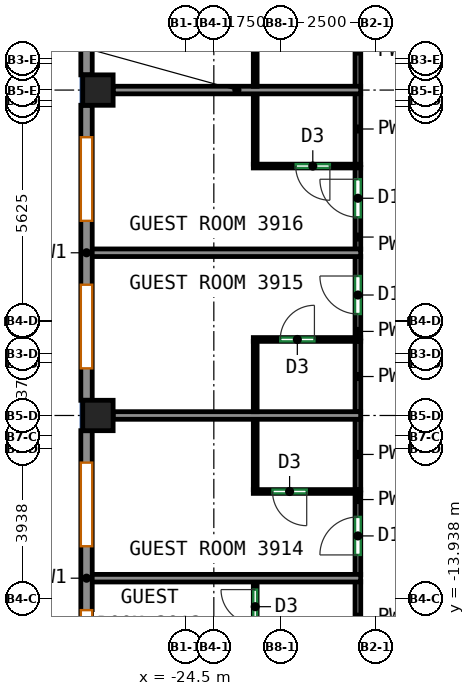
"""IFC4 building model, lengths in metres.
Left out: names, types, materials, properties, quantities, classifications, styles, units other than length and angle.
Written with IfcOpenShell. Run it as: python <this file> out.ifc"""

import sys

from ifc_helpers import new_model, si_unit, direction, frame, frame_2d, origin, origin_2d, place, context, subcontext, project, spatial, rectangle, extrude, source, transform, mapped, element, fill, save


model = new_model("IFC4")
c1 = context("Model", 3, precision=1e-05, world=origin(), true_north=direction((0.0, 1.0)))
c2 = subcontext(c1, "Body", "Model", "MODEL_VIEW")
j1 = project(units=[si_unit("LENGTHUNIT", "METRE"), si_unit("PLANEANGLEUNIT", "RADIAN")], contexts=[c1])
p1 = place(None, origin())
s1 = spatial("IfcSite", under=j1, at=p1, CompositionType="ELEMENT")
p2 = place(p1, origin())
s2 = spatial("IfcBuilding", under=s1, at=p2, CompositionType="ELEMENT")
p3 = place(p2, frame((0.0, 0.0, 168.5)))
s3 = spatial("IfcBuildingStorey", under=s2, at=p3, CompositionType="ELEMENT", Elevation=168.5)
m1 = source(origin(), c2, "Body", "SweptSolid", [
    extrude(rectangle(XDim=0.8, YDim=0.8, at=origin_2d()), origin(), (0.0, 0.0, 1.0), 3.12),
])
for number, where, z_axis, x_axis in (
    (1, (-26.8, -9.125, 0.0), (0.0, 0.0, 1.0), (1.0, 0.0, 0.0)),
    (2, (-26.8, -0.562, 0.0), (0.0, 0.0, 1.0), (1.0, 0.0, 0.0)),
):
    element("IfcColumn", number, at=place(p3, frame(where, z_axis=z_axis, x_axis=x_axis)), inside=s3, PredefinedType="COLUMN", context=c2, shape_type="MappedRepresentation", body=[
        mapped(m1, transform((0.0, 0.0, 0.0))),
    ])
m2 = source(origin(), c2, "Body", "SweptSolid", [
    extrude(rectangle(XDim=7.763, YDim=0.3, at=frame_2d((3.881, 0.0))), origin(), (0.0, 0.0, 1.0), 3.12),
])
p4 = place(p3, frame((-27.1, 7.6, 0.0), z_axis=(0.0, 0.0, 1.0), x_axis=(0.0, -1.0, 0.0)))
e3 = element("IfcWall", 3, at=p4, inside=s3, PredefinedType="SOLIDWALL", context=c2, shape_type="MappedRepresentation", body=[
    mapped(m2, transform((0.0, 0.0, 0.0))),
])
p5 = place(p4, frame((0.841, 0.0, 0.85)))
e4 = element("IfcOpeningElement", 4, at=p5, cuts=e3, PredefinedType="OPENING", context=c2, shape_type="SweptSolid", body=[
    extrude(rectangle(XDim=2.2, YDim=1.95, at=frame_2d((1.1, 0.975))), frame((0.0, 0.16, 0.0), z_axis=(0.0, -1.0, 0.0), x_axis=(1.0, 0.0, 0.0)), (0.0, 0.0, 1.0), 0.32),
])
p6 = place(p4, frame((4.722, 0.0, 0.85)))
e5 = element("IfcOpeningElement", 5, at=p6, cuts=e3, PredefinedType="OPENING", context=c2, shape_type="SweptSolid", body=[
    extrude(rectangle(XDim=2.2, YDim=1.95, at=frame_2d((1.1, 0.975))), frame((0.0, 0.16, 0.0), z_axis=(0.0, -1.0, 0.0), x_axis=(1.0, 0.0, 0.0)), (0.0, 0.0, 1.0), 0.32),
])
p7 = place(p3, frame((-27.1, -0.962, 0.0), z_axis=(0.0, 0.0, 1.0), x_axis=(0.0, -1.0, 0.0)))
e6 = element("IfcWall", 6, at=p7, inside=s3, PredefinedType="SOLIDWALL", context=c2, shape_type="MappedRepresentation", body=[
    mapped(m2, transform((0.0, 0.0, 0.0))),
])
p8 = place(p7, frame((0.841, 0.0, 0.85)))
e7 = element("IfcOpeningElement", 7, at=p8, cuts=e6, PredefinedType="OPENING", context=c2, shape_type="SweptSolid", body=[
    extrude(rectangle(XDim=2.2, YDim=1.95, at=frame_2d((1.1, 0.975))), frame((0.0, 0.16, 0.0), z_axis=(0.0, -1.0, 0.0), x_axis=(1.0, 0.0, 0.0)), (0.0, 0.0, 1.0), 0.32),
])
p9 = place(p7, frame((4.722, 0.0, 0.85)))
e8 = element("IfcOpeningElement", 8, at=p9, cuts=e6, PredefinedType="OPENING", context=c2, shape_type="SweptSolid", body=[
    extrude(rectangle(XDim=2.2, YDim=1.95, at=frame_2d((1.1, 0.975))), frame((0.0, 0.16, 0.0), z_axis=(0.0, -1.0, 0.0), x_axis=(1.0, 0.0, 0.0)), (0.0, 0.0, 1.0), 0.32),
])
p10 = place(p3, frame((-27.1, -9.525, 0.0), z_axis=(0.0, 0.0, 1.0), x_axis=(0.0, -1.0, 0.0)))
e9 = element("IfcWall", 9, at=p10, inside=s3, PredefinedType="SOLIDWALL", context=c2, shape_type="MappedRepresentation", body=[
    mapped(m2, transform((0.0, 0.0, 0.0))),
])
p11 = place(p10, frame((0.841, 0.0, 0.85)))
e10 = element("IfcOpeningElement", 10, at=p11, cuts=e9, PredefinedType="OPENING", context=c2, shape_type="SweptSolid", body=[
    extrude(rectangle(XDim=2.2, YDim=1.95, at=frame_2d((1.1, 0.975))), frame((0.0, 0.16, 0.0), z_axis=(0.0, -1.0, 0.0), x_axis=(1.0, 0.0, 0.0)), (0.0, 0.0, 1.0), 0.32),
])
p12 = place(p10, frame((4.722, 0.0, 0.85)))
e11 = element("IfcOpeningElement", 11, at=p12, cuts=e9, PredefinedType="OPENING", context=c2, shape_type="SweptSolid", body=[
    extrude(rectangle(XDim=2.2, YDim=1.95, at=frame_2d((1.1, 0.975))), frame((0.0, 0.16, 0.0), z_axis=(0.0, -1.0, 0.0), x_axis=(1.0, 0.0, 0.0)), (0.0, 0.0, 1.0), 0.32),
])
p13 = place(p3, frame((-19.959, -15.366, 0.0), z_axis=(0.0, 0.0, 1.0), x_axis=(0.0, 1.0, 0.0)))
e12 = element("IfcWall", 12, at=p13, inside=s3, PredefinedType="PARTITIONING", context=c2, shape_type="SweptSolid", body=[
    extrude(rectangle(XDim=1.87, YDim=0.15, at=frame_2d((0.935, 0.0))), origin(), (0.0, 0.0, 1.0), 3.12),
])
p14 = place(p3, frame((-19.959, -13.316, 0.0), z_axis=(0.0, 0.0, 1.0), x_axis=(0.0, 1.0, 0.0)))
e13 = element("IfcWall", 13, at=p14, inside=s3, PredefinedType="PARTITIONING", context=c2, shape_type="SweptSolid", body=[
    extrude(rectangle(XDim=2.151, YDim=0.15, at=frame_2d((1.075, 0.0))), origin(), (0.0, 0.0, 1.0), 3.12),
])
p15 = place(p14, frame((0.522, 0.0, 0.0)))
e14 = element("IfcOpeningElement", 14, at=p15, cuts=e13, PredefinedType="OPENING", context=c2, shape_type="SweptSolid", body=[
    extrude(rectangle(XDim=1.0, YDim=2.1, at=frame_2d((0.5, 1.05))), frame((0.0, 0.085, 0.0), z_axis=(0.0, -1.0, 0.0), x_axis=(1.0, 0.0, 0.0)), (0.0, 0.0, 1.0), 0.17),
])
p16 = place(p3, frame((-19.959, -11.085, 0.0), z_axis=(0.0, 0.0, 1.0), x_axis=(0.0, 1.0, 0.0)))
e15 = element("IfcWall", 15, at=p16, inside=s3, PredefinedType="PARTITIONING", context=c2, shape_type="SweptSolid", body=[
    extrude(rectangle(XDim=1.87, YDim=0.15, at=frame_2d((0.935, 0.0))), origin(), (0.0, 0.0, 1.0), 3.12),
])
p17 = place(p3, frame((-19.959, -7.085, 0.0), z_axis=(0.0, 0.0, 1.0), x_axis=(0.0, 1.0, 0.0)))
e16 = element("IfcWall", 16, at=p17, inside=s3, PredefinedType="PARTITIONING", context=c2, shape_type="SweptSolid", body=[
    extrude(rectangle(XDim=2.152, YDim=0.15, at=frame_2d((1.076, 0.0))), origin(), (0.0, 0.0, 1.0), 3.12),
])
p18 = place(p17, frame((0.63, 0.0, 0.0)))
e17 = element("IfcOpeningElement", 17, at=p18, cuts=e16, PredefinedType="OPENING", context=c2, shape_type="SweptSolid", body=[
    extrude(rectangle(XDim=1.0, YDim=2.1, at=frame_2d((0.5, 1.05))), frame((0.0, 0.085, 0.0), z_axis=(0.0, -1.0, 0.0), x_axis=(1.0, 0.0, 0.0)), (0.0, 0.0, 1.0), 0.17),
])
p19 = place(p3, frame((-19.959, -9.035, 0.0), z_axis=(0.0, 0.0, 1.0), x_axis=(0.0, 1.0, 0.0)))
e18 = element("IfcWall", 18, at=p19, inside=s3, PredefinedType="PARTITIONING", context=c2, shape_type="SweptSolid", body=[
    extrude(rectangle(XDim=1.87, YDim=0.15, at=frame_2d((0.935, 0.0))), origin(), (0.0, 0.0, 1.0), 3.12),
])
p20 = place(p3, frame((-19.959, -4.753, 0.0), z_axis=(0.0, 0.0, 1.0), x_axis=(0.0, 1.0, 0.0)))
e19 = element("IfcWall", 19, at=p20, inside=s3, PredefinedType="PARTITIONING", context=c2, shape_type="SweptSolid", body=[
    extrude(rectangle(XDim=2.151, YDim=0.15, at=frame_2d((1.075, 0.0))), origin(), (0.0, 0.0, 1.0), 3.12),
])
p21 = place(p20, frame((0.844, 0.0, 0.0)))
e20 = element("IfcOpeningElement", 20, at=p21, cuts=e19, PredefinedType="OPENING", context=c2, shape_type="SweptSolid", body=[
    extrude(rectangle(XDim=1.0, YDim=2.1, at=frame_2d((0.5, 1.05))), frame((0.0, 0.085, 0.0), z_axis=(0.0, -1.0, 0.0), x_axis=(1.0, 0.0, 0.0)), (0.0, 0.0, 1.0), 0.17),
])
for number, where, z_axis, x_axis in (
    (21, (-19.959, -2.522, 0.0), (0.0, 0.0, 1.0), (0.0, 1.0, 0.0)),
    (22, (-19.959, -0.472, 0.0), (0.0, 0.0, 1.0), (0.0, 1.0, 0.0)),
):
    element("IfcWall", number, at=place(p3, frame(where, z_axis=z_axis, x_axis=x_axis)), inside=s3, PredefinedType="PARTITIONING", context=c2, shape_type="SweptSolid", body=[
        extrude(rectangle(XDim=1.87, YDim=0.15, at=frame_2d((0.935, 0.0))), origin(), (0.0, 0.0, 1.0), 3.12),
    ])
p22 = place(p3, frame((-22.661, -15.356, 0.0), z_axis=(0.0, 0.0, 1.0), x_axis=(0.0, 1.0, 0.0)))
e23 = element("IfcWall", 23, at=p22, inside=s3, PredefinedType="PARTITIONING", context=c2, shape_type="SweptSolid", body=[
    extrude(rectangle(XDim=1.85, YDim=0.1, at=frame_2d((0.925, 0.0))), origin(), (0.0, 0.0, 1.0), 3.12),
])
p23 = place(p22, frame((0.75, 0.0, 0.0)))
e24 = element("IfcOpeningElement", 24, at=p23, cuts=e23, PredefinedType="OPENING", context=c2, shape_type="SweptSolid", body=[
    extrude(rectangle(XDim=0.9, YDim=2.1, at=frame_2d((0.45, 1.05))), frame((0.0, 0.06, 0.0), z_axis=(0.0, -1.0, 0.0), x_axis=(1.0, 0.0, 0.0)), (0.0, 0.0, 1.0), 0.12),
])
p24 = place(p3, frame((-27.0, -13.406, 0.0), z_axis=(0.0, 0.0, 1.0), x_axis=(1.0, 0.0, 0.0)))
e25 = element("IfcWall", 25, at=p24, inside=s3, PredefinedType="PARTITIONING", context=c2, shape_type="SweptSolid", body=[
    extrude(rectangle(XDim=7.114, YDim=0.2, at=frame_2d((3.557, 0.0))), origin(), (0.0, 0.0, 1.0), 3.12),
])
p25 = place(p3, frame((-19.886, -11.125, 0.0), z_axis=(0.0, 0.0, 1.0), x_axis=(-1.0, 0.0, 0.0)))
e26 = element("IfcWall", 26, at=p25, inside=s3, PredefinedType="PARTITIONING", context=c2, shape_type="SweptSolid", body=[
    extrude(rectangle(XDim=2.825, YDim=0.1, at=frame_2d((1.413, 0.0))), origin(), (0.0, 0.0, 1.0), 3.12),
])
p26 = place(p25, frame((1.42, 0.0, 0.0)))
e27 = element("IfcOpeningElement", 27, at=p26, cuts=e26, PredefinedType="OPENING", context=c2, shape_type="SweptSolid", body=[
    extrude(rectangle(XDim=0.9, YDim=2.1, at=frame_2d((0.45, 1.05))), frame((0.0, 0.06, 0.0), z_axis=(0.0, -1.0, 0.0), x_axis=(1.0, 0.0, 0.0)), (0.0, 0.0, 1.0), 0.12),
])
p27 = place(p3, frame((-22.661, -11.075, 0.0), z_axis=(0.0, 0.0, 1.0), x_axis=(0.0, 1.0, 0.0)))
e28 = element("IfcWall", 28, at=p27, inside=s3, PredefinedType="PARTITIONING", context=c2, shape_type="SweptSolid", body=[
    extrude(rectangle(XDim=1.85, YDim=0.1, at=frame_2d((0.925, 0.0))), origin(), (0.0, 0.0, 1.0), 3.12),
])
p28 = place(p3, frame((-26.4, -9.125, 0.0), z_axis=(0.0, 0.0, 1.0), x_axis=(1.0, 0.0, 0.0)))
e29 = element("IfcWall", 29, at=p28, inside=s3, PredefinedType="PARTITIONING", context=c2, shape_type="SweptSolid", body=[
    extrude(rectangle(XDim=6.514, YDim=0.2, at=frame_2d((3.257, 0.0))), origin(), (0.0, 0.0, 1.0), 3.12),
])
p29 = place(p3, frame((-22.711, -7.125, 0.0), z_axis=(0.0, 0.0, 1.0), x_axis=(1.0, 0.0, 0.0)))
e30 = element("IfcWall", 30, at=p29, inside=s3, PredefinedType="PARTITIONING", context=c2, shape_type="SweptSolid", body=[
    extrude(rectangle(XDim=2.825, YDim=0.1, at=frame_2d((1.413, 0.0))), origin(), (0.0, 0.0, 1.0), 3.12),
])
p30 = place(p29, frame((0.708, 0.0, 0.0)))
e31 = element("IfcOpeningElement", 31, at=p30, cuts=e30, PredefinedType="OPENING", context=c2, shape_type="SweptSolid", body=[
    extrude(rectangle(XDim=0.9, YDim=2.1, at=frame_2d((0.45, 1.05))), frame((0.0, 0.06, 0.0), z_axis=(0.0, -1.0, 0.0), x_axis=(1.0, 0.0, 0.0)), (0.0, 0.0, 1.0), 0.12),
])
p31 = place(p3, frame((-22.661, -9.025, 0.0), z_axis=(0.0, 0.0, 1.0), x_axis=(0.0, 1.0, 0.0)))
e32 = element("IfcWall", 32, at=p31, inside=s3, PredefinedType="PARTITIONING", context=c2, shape_type="SweptSolid", body=[
    extrude(rectangle(XDim=1.85, YDim=0.1, at=frame_2d((0.925, 0.0))), origin(), (0.0, 0.0, 1.0), 3.12),
])
p32 = place(p3, frame((-27.0, -4.843, 0.0), z_axis=(0.0, 0.0, 1.0), x_axis=(1.0, 0.0, 0.0)))
e33 = element("IfcWall", 33, at=p32, inside=s3, PredefinedType="PARTITIONING", context=c2, shape_type="SweptSolid", body=[
    extrude(rectangle(XDim=7.114, YDim=0.2, at=frame_2d((3.557, 0.0))), origin(), (0.0, 0.0, 1.0), 3.12),
])
p33 = place(p3, frame((-19.886, -2.562, 0.0), z_axis=(0.0, 0.0, 1.0), x_axis=(-1.0, 0.0, 0.0)))
e34 = element("IfcWall", 34, at=p33, inside=s3, PredefinedType="PARTITIONING", context=c2, shape_type="SweptSolid", body=[
    extrude(rectangle(XDim=2.825, YDim=0.1, at=frame_2d((1.413, 0.0))), origin(), (0.0, 0.0, 1.0), 3.12),
])
p34 = place(p33, frame((0.81, 0.0, 0.0)))
e35 = element("IfcOpeningElement", 35, at=p34, cuts=e34, PredefinedType="OPENING", context=c2, shape_type="SweptSolid", body=[
    extrude(rectangle(XDim=0.9, YDim=2.1, at=frame_2d((0.45, 1.05))), frame((0.0, 0.06, 0.0), z_axis=(0.0, -1.0, 0.0), x_axis=(1.0, 0.0, 0.0)), (0.0, 0.0, 1.0), 0.12),
])
p35 = place(p3, frame((-22.661, -2.512, 0.0), z_axis=(0.0, 0.0, 1.0), x_axis=(0.0, 1.0, 0.0)))
e36 = element("IfcWall", 36, at=p35, inside=s3, PredefinedType="PARTITIONING", context=c2, shape_type="SweptSolid", body=[
    extrude(rectangle(XDim=1.85, YDim=0.1, at=frame_2d((0.925, 0.0))), origin(), (0.0, 0.0, 1.0), 3.12),
])
p36 = place(p3, frame((-26.4, -0.562, 0.0), z_axis=(0.0, 0.0, 1.0), x_axis=(1.0, 0.0, 0.0)))
e37 = element("IfcWall", 37, at=p36, inside=s3, PredefinedType="PARTITIONING", context=c2, shape_type="SweptSolid", body=[
    extrude(rectangle(XDim=6.514, YDim=0.2, at=frame_2d((3.257, 0.0))), origin(), (0.0, 0.0, 1.0), 2.52),
])
p37 = place(p3, frame((-22.661, -0.462, 0.0), z_axis=(0.0, 0.0, 1.0), x_axis=(0.0, 1.0, 0.0)))
e38 = element("IfcWall", 38, at=p37, inside=s3, PredefinedType="PARTITIONING", context=c2, shape_type="SweptSolid", body=[
    extrude(rectangle(XDim=1.85, YDim=0.1, at=frame_2d((0.925, 0.0))), origin(), (0.0, 0.0, 1.0), 3.12),
])
p38 = place(p8, origin())
e39 = element("IfcWindow", 39, at=p38, inside=s3, PartitioningType="SINGLE_PANEL", PredefinedType="WINDOW", context=c2, shape_type="SweptSolid", body=[
    extrude(rectangle(XDim=2.2, YDim=1.95, at=frame_2d((1.1, 0.975))), frame((0.0, 0.03, 0.0), z_axis=(0.0, -1.0, 0.0), x_axis=(1.0, 0.0, 0.0)), (0.0, 0.0, 1.0), 0.06),
])
fill(e7, e39)
p39 = place(p9, origin())
e40 = element("IfcWindow", 40, at=p39, inside=s3, PartitioningType="SINGLE_PANEL", PredefinedType="WINDOW", context=c2, shape_type="SweptSolid", body=[
    extrude(rectangle(XDim=2.2, YDim=1.95, at=frame_2d((1.1, 0.975))), frame((0.0, 0.03, 0.0), z_axis=(0.0, -1.0, 0.0), x_axis=(1.0, 0.0, 0.0)), (0.0, 0.0, 1.0), 0.06),
])
fill(e8, e40)
p40 = place(p11, origin())
e41 = element("IfcWindow", 41, at=p40, inside=s3, PartitioningType="SINGLE_PANEL", PredefinedType="WINDOW", context=c2, shape_type="SweptSolid", body=[
    extrude(rectangle(XDim=2.2, YDim=1.95, at=frame_2d((1.1, 0.975))), frame((0.0, 0.03, 0.0), z_axis=(0.0, -1.0, 0.0), x_axis=(1.0, 0.0, 0.0)), (0.0, 0.0, 1.0), 0.06),
])
fill(e10, e41)
p41 = place(p12, origin())
e42 = element("IfcWindow", 42, at=p41, inside=s3, PartitioningType="SINGLE_PANEL", PredefinedType="WINDOW", context=c2, shape_type="SweptSolid", body=[
    extrude(rectangle(XDim=2.2, YDim=1.95, at=frame_2d((1.1, 0.975))), frame((0.0, 0.03, 0.0), z_axis=(0.0, -1.0, 0.0), x_axis=(1.0, 0.0, 0.0)), (0.0, 0.0, 1.0), 0.06),
])
fill(e11, e42)
p42 = place(p23, origin())
e43 = element("IfcDoor", 43, at=p42, inside=s3, OperationType="SINGLE_SWING_RIGHT", PredefinedType="DOOR", context=c2, shape_type="SweptSolid", body=[
    extrude(rectangle(XDim=0.9, YDim=2.1, at=frame_2d((0.45, 1.05))), frame((0.0, 0.025, 0.0), z_axis=(0.0, -1.0, 0.0), x_axis=(1.0, 0.0, 0.0)), (0.0, 0.0, 1.0), 0.05),
])
fill(e24, e43)
p43 = place(p15, origin())
e44 = element("IfcDoor", 44, at=p43, inside=s3, OperationType="SINGLE_SWING_LEFT", PredefinedType="DOOR", context=c2, shape_type="SweptSolid", body=[
    extrude(rectangle(XDim=1.0, YDim=2.1, at=frame_2d((0.5, 1.05))), frame((0.0, 0.025, 0.0), z_axis=(0.0, -1.0, 0.0), x_axis=(1.0, 0.0, 0.0)), (0.0, 0.0, 1.0), 0.05),
])
fill(e14, e44)
p44 = place(p26, origin())
e45 = element("IfcDoor", 45, at=p44, inside=s3, OperationType="SINGLE_SWING_LEFT", PredefinedType="DOOR", context=c2, shape_type="SweptSolid", body=[
    extrude(rectangle(XDim=0.9, YDim=2.1, at=frame_2d((0.45, 1.05))), frame((0.0, 0.025, 0.0), z_axis=(0.0, -1.0, 0.0), x_axis=(1.0, 0.0, 0.0)), (0.0, 0.0, 1.0), 0.05),
])
fill(e27, e45)
p45 = place(p30, origin())
e46 = element("IfcDoor", 46, at=p45, inside=s3, OperationType="SINGLE_SWING_RIGHT", PredefinedType="DOOR", context=c2, shape_type="SweptSolid", body=[
    extrude(rectangle(XDim=0.9, YDim=2.1, at=frame_2d((0.45, 1.05))), frame((0.0, 0.025, 0.0), z_axis=(0.0, -1.0, 0.0), x_axis=(1.0, 0.0, 0.0)), (0.0, 0.0, 1.0), 0.05),
])
fill(e31, e46)
p46 = place(p18, origin())
e47 = element("IfcDoor", 47, at=p46, inside=s3, OperationType="SINGLE_SWING_RIGHT", PredefinedType="DOOR", context=c2, shape_type="SweptSolid", body=[
    extrude(rectangle(XDim=1.0, YDim=2.1, at=frame_2d((0.5, 1.05))), frame((0.0, 0.025, 0.0), z_axis=(0.0, -1.0, 0.0), x_axis=(1.0, 0.0, 0.0)), (0.0, 0.0, 1.0), 0.05),
])
fill(e17, e47)
p47 = place(p21, origin())
e48 = element("IfcDoor", 48, at=p47, inside=s3, OperationType="SINGLE_SWING_RIGHT", PredefinedType="DOOR", context=c2, shape_type="SweptSolid", body=[
    extrude(rectangle(XDim=1.0, YDim=2.1, at=frame_2d((0.5, 1.05))), frame((0.0, 0.025, 0.0), z_axis=(0.0, -1.0, 0.0), x_axis=(1.0, 0.0, 0.0)), (0.0, 0.0, 1.0), 0.05),
])
fill(e20, e48)
p48 = place(p34, origin())
e49 = element("IfcDoor", 49, at=p48, inside=s3, OperationType="SINGLE_SWING_LEFT", PredefinedType="DOOR", context=c2, shape_type="SweptSolid", body=[
    extrude(rectangle(XDim=0.9, YDim=2.1, at=frame_2d((0.45, 1.05))), frame((0.0, 0.025, 0.0), z_axis=(0.0, -1.0, 0.0), x_axis=(1.0, 0.0, 0.0)), (0.0, 0.0, 1.0), 0.05),
])
fill(e35, e49)
save(model, sys.argv[1])
